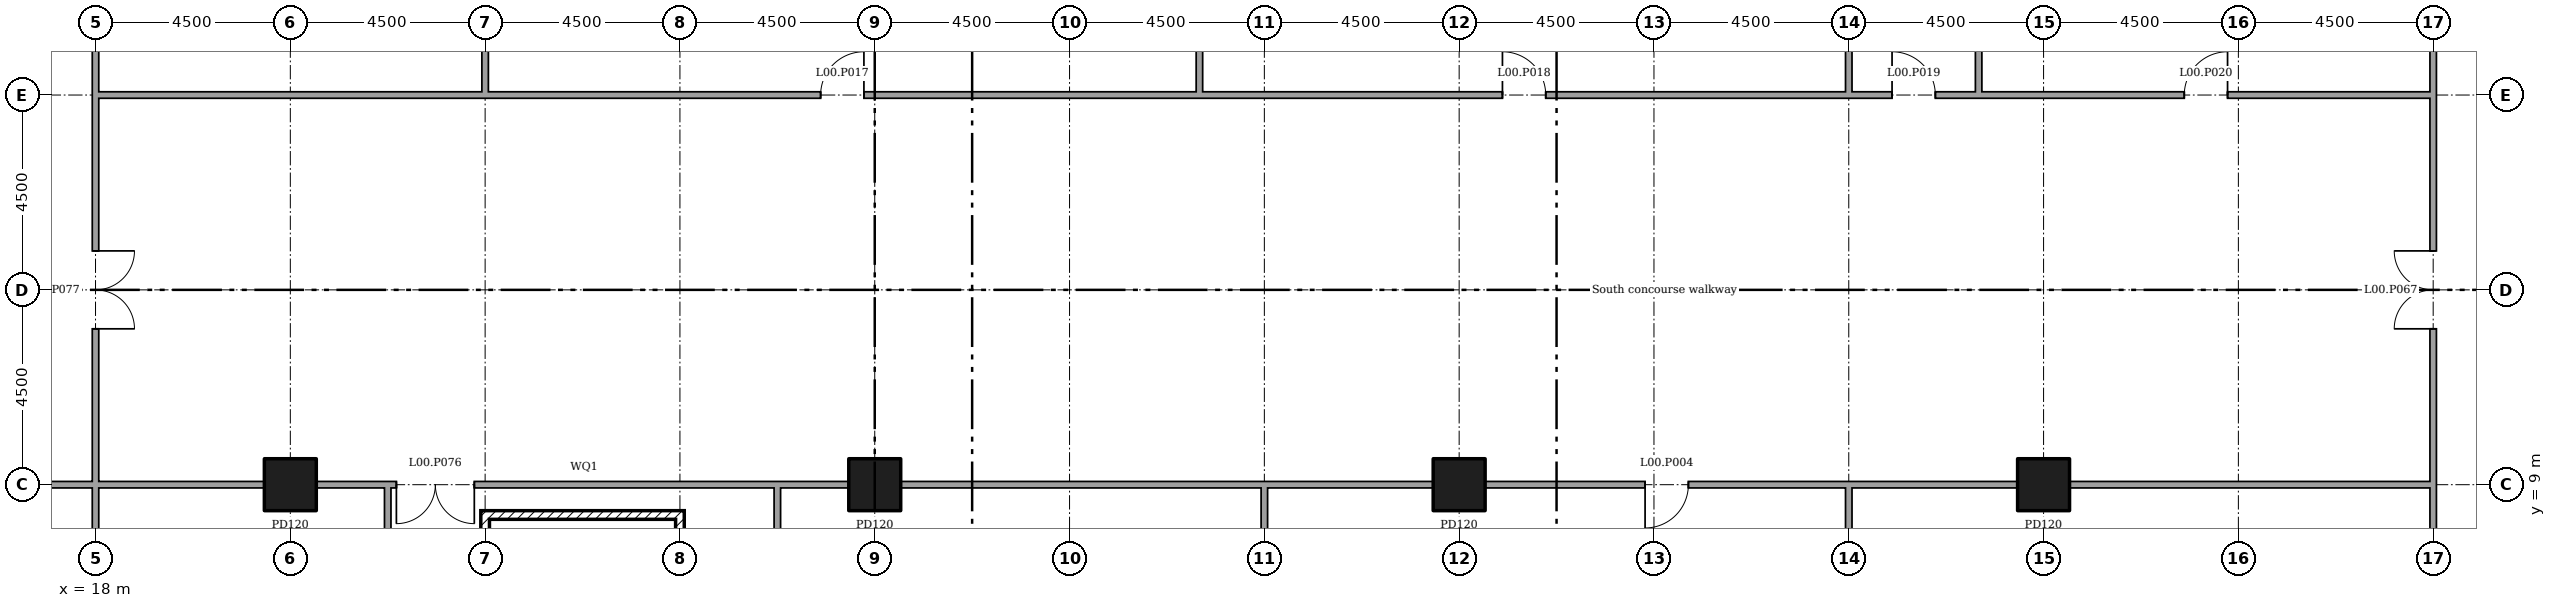
"""IFC4 building model, lengths in metres.
Left out: names, types, materials, properties, quantities, classifications, styles, units other than length and angle.
Written with IfcOpenShell. Run it as: python <this file> out.ifc"""

import sys

from ifc_helpers import new_model, si_unit, direction, frame, frame_2d, origin, origin_2d, place, context, subcontext, project, spatial, rectangle, extrude, element, fill, save


model = new_model("IFC4")
c1 = context("Model", 3, precision=1e-05, world=origin(), true_north=direction((0.0, 1.0)))
c2 = subcontext(c1, "Body", "Model", "MODEL_VIEW")
j1 = project(units=[si_unit("LENGTHUNIT", "METRE"), si_unit("PLANEANGLEUNIT", "RADIAN")], contexts=[c1])
p1 = place(None, origin())
s1 = spatial("IfcSite", under=j1, at=p1, CompositionType="ELEMENT")
p2 = place(p1, origin())
s2 = spatial("IfcBuilding", under=s1, at=p2, CompositionType="ELEMENT")
p3 = place(p2, origin())
s3 = spatial("IfcBuildingStorey", under=s2, at=p3, CompositionType="ELEMENT", Elevation=0.0)
for number, where in (
    (1, (22.5, 9.0, 0.0)),
    (2, (36.0, 9.0, 0.0)),
    (3, (49.5, 9.0, 0.0)),
    (4, (63.0, 9.0, 0.0)),
):
    element("IfcColumn", number, at=place(p3, frame(where)), inside=s3, PredefinedType="COLUMN", context=c2, shape_type="SweptSolid", body=[
        extrude(rectangle(XDim=1.2, YDim=1.2, at=origin_2d()), origin(), (0.0, 0.0, 1.0), 6.0),
    ])
p4 = place(p3, frame((72.0, 0.3, 0.0), z_axis=(0.0, 0.0, 1.0), x_axis=(0.0, 1.0, 0.0)))
e5 = element("IfcWall", 5, at=p4, inside=s3, PredefinedType="PARTITIONING", context=c2, shape_type="SweptSolid", body=[
    extrude(rectangle(XDim=8.775, YDim=0.15, at=frame_2d((4.387, 0.0))), origin(), (0.0, 0.0, 1.0), 5.55),
])
p5 = place(p4, frame((3.85, 0.0, 0.0)))
e6 = element("IfcOpeningElement", 6, at=p5, cuts=e5, PredefinedType="OPENING", context=c2, shape_type="SweptSolid", body=[
    extrude(rectangle(XDim=1.0, YDim=2.1, at=frame_2d((0.5, 1.05))), frame((0.0, 0.085, 0.0), z_axis=(0.0, -1.0, 0.0), x_axis=(1.0, 0.0, 0.0)), (0.0, 0.0, 1.0), 0.17),
])
p6 = place(p3, frame((72.0, 9.0, 0.0), z_axis=(0.0, 0.0, 1.0), x_axis=(0.0, 1.0, 0.0)))
e7 = element("IfcWall", 7, at=p6, inside=s3, PredefinedType="PARTITIONING", context=c2, shape_type="SweptSolid", body=[
    extrude(rectangle(XDim=9.075, YDim=0.15, at=frame_2d((4.538, 0.0))), origin(), (0.0, 0.0, 1.0), 5.55),
])
p7 = place(p6, frame((3.6, 0.0, 0.0)))
e8 = element("IfcOpeningElement", 8, at=p7, cuts=e7, PredefinedType="OPENING", context=c2, shape_type="SweptSolid", body=[
    extrude(rectangle(XDim=1.8, YDim=2.1, at=frame_2d((0.9, 1.05))), frame((0.0, 0.085, 0.0), z_axis=(0.0, -1.0, 0.0), x_axis=(1.0, 0.0, 0.0)), (0.0, 0.0, 1.0), 0.17),
])
p8 = place(p3, frame((72.0, 18.0, 0.0), z_axis=(0.0, 0.0, 1.0), x_axis=(0.0, 1.0, 0.0)))
e9 = element("IfcWall", 9, at=p8, inside=s3, PredefinedType="PARTITIONING", context=c2, shape_type="SweptSolid", body=[
    extrude(rectangle(XDim=4.425, YDim=0.15, at=frame_2d((2.212, 0.0))), origin(), (0.0, 0.0, 1.0), 5.55),
])
p9 = place(p3, frame((18.0, 0.3, 0.0), z_axis=(0.0, 0.0, 1.0), x_axis=(0.0, 1.0, 0.0)))
e10 = element("IfcWall", 10, at=p9, inside=s3, PredefinedType="PARTITIONING", context=c2, shape_type="SweptSolid", body=[
    extrude(rectangle(XDim=8.775, YDim=0.15, at=frame_2d((4.387, 0.0))), origin(), (0.0, 0.0, 1.0), 5.55),
])
p10 = place(p3, frame((9.595, 9.0, 0.0)))
e11 = element("IfcWall", 11, at=p10, inside=s3, PredefinedType="PARTITIONING", context=c2, shape_type="SweptSolid", body=[
    extrude(rectangle(XDim=8.48, YDim=0.15, at=frame_2d((4.24, 0.0))), origin(), (0.0, 0.0, 1.0), 5.55),
])
p11 = place(p10, frame((3.7, 0.0, 0.0)))
e12 = element("IfcOpeningElement", 12, at=p11, cuts=e11, PredefinedType="OPENING", context=c2, shape_type="SweptSolid", body=[
    extrude(rectangle(XDim=1.0, YDim=2.1, at=frame_2d((0.5, 1.05))), frame((0.0, 0.085, 0.0), z_axis=(0.0, -1.0, 0.0), x_axis=(1.0, 0.0, 0.0)), (0.0, 0.0, 1.0), 0.17),
])
p12 = place(p3, frame((24.75, 0.3, 0.0), z_axis=(0.0, 0.0, 1.0), x_axis=(0.0, 1.0, 0.0)))
e13 = element("IfcWall", 13, at=p12, inside=s3, PredefinedType="PARTITIONING", context=c2, shape_type="SweptSolid", body=[
    extrude(rectangle(XDim=8.775, YDim=0.15, at=frame_2d((4.387, 0.0))), origin(), (0.0, 0.0, 1.0), 5.55),
])
p13 = place(p12, frame((3.85, 0.0, 0.0)))
e14 = element("IfcOpeningElement", 14, at=p13, cuts=e13, PredefinedType="OPENING", context=c2, shape_type="SweptSolid", body=[
    extrude(rectangle(XDim=1.0, YDim=2.1, at=frame_2d((0.5, 1.05))), frame((0.0, 0.085, 0.0), z_axis=(0.0, -1.0, 0.0), x_axis=(1.0, 0.0, 0.0)), (0.0, 0.0, 1.0), 0.17),
])
p14 = place(p3, frame((18.075, 9.0, 0.0)))
e15 = element("IfcWall", 15, at=p14, inside=s3, PredefinedType="PARTITIONING", context=c2, shape_type="SweptSolid", body=[
    extrude(rectangle(XDim=3.83, YDim=0.15, at=frame_2d((1.915, 0.0))), origin(), (0.0, 0.0, 1.0), 5.55),
])
p15 = place(p3, frame((23.095, 9.0, 0.0)))
e16 = element("IfcWall", 16, at=p15, inside=s3, PredefinedType="PARTITIONING", context=c2, shape_type="SweptSolid", body=[
    extrude(rectangle(XDim=1.655, YDim=0.15, at=frame_2d((0.828, 0.0))), origin(), (0.0, 0.0, 1.0), 5.55),
])
p16 = place(p3, frame((33.75, 0.3, 0.0), z_axis=(0.0, 0.0, 1.0), x_axis=(0.0, 1.0, 0.0)))
e17 = element("IfcWall", 17, at=p16, inside=s3, PredefinedType="PARTITIONING", context=c2, shape_type="SweptSolid", body=[
    extrude(rectangle(XDim=8.775, YDim=0.15, at=frame_2d((4.387, 0.0))), origin(), (0.0, 0.0, 1.0), 5.55),
])
p17 = place(p16, frame((3.85, 0.0, 0.0)))
e18 = element("IfcOpeningElement", 18, at=p17, cuts=e17, PredefinedType="OPENING", context=c2, shape_type="SweptSolid", body=[
    extrude(rectangle(XDim=1.0, YDim=2.1, at=frame_2d((0.5, 1.05))), frame((0.0, 0.085, 0.0), z_axis=(0.0, -1.0, 0.0), x_axis=(1.0, 0.0, 0.0)), (0.0, 0.0, 1.0), 0.17),
])
p18 = place(p3, frame((24.825, 9.0, 0.0)))
e19 = element("IfcWall", 19, at=p18, inside=s3, PredefinedType="PARTITIONING", context=c2, shape_type="SweptSolid", body=[
    extrude(rectangle(XDim=8.925, YDim=0.15, at=frame_2d((4.462, 0.0))), origin(), (0.0, 0.0, 1.0), 5.55),
])
p19 = place(p18, frame((0.125, 0.0, 0.0)))
e20 = element("IfcOpeningElement", 20, at=p19, cuts=e19, PredefinedType="OPENING", context=c2, shape_type="SweptSolid", body=[
    extrude(rectangle(XDim=1.8, YDim=2.1, at=frame_2d((0.9, 1.05))), frame((0.0, 0.085, 0.0), z_axis=(0.0, -1.0, 0.0), x_axis=(1.0, 0.0, 0.0)), (0.0, 0.0, 1.0), 0.17),
])
p20 = place(p3, frame((27.0, 0.3, 0.0), z_axis=(0.0, 0.0, 1.0), x_axis=(0.0, 1.0, 0.0)))
e21 = element("IfcWall", 21, at=p20, inside=s3, PredefinedType="SOLIDWALL", context=c2, shape_type="SweptSolid", body=[
    extrude(rectangle(XDim=8.1, YDim=0.2, at=frame_2d((4.05, 0.0))), origin(), (0.0, 0.0, 1.0), 5.55),
])
p21 = place(p20, frame((0.6, 0.0, 0.0)))
e22 = element("IfcOpeningElement", 22, at=p21, cuts=e21, PredefinedType="OPENING", context=c2, shape_type="SweptSolid", body=[
    extrude(rectangle(XDim=1.1, YDim=2.1, at=frame_2d((0.55, 1.05))), frame((0.0, 0.11, 0.0), z_axis=(0.0, -1.0, 0.0), x_axis=(1.0, 0.0, 0.0)), (0.0, 0.0, 1.0), 0.22),
])
p22 = place(p3, frame((31.5, 0.3, 0.0), z_axis=(0.0, 0.0, 1.0), x_axis=(0.0, 1.0, 0.0)))
e23 = element("IfcWall", 23, at=p22, inside=s3, PredefinedType="SOLIDWALL", context=c2, shape_type="SweptSolid", body=[
    extrude(rectangle(XDim=8.1, YDim=0.2, at=frame_2d((4.05, 0.0))), origin(), (0.0, 0.0, 1.0), 5.55),
])
p23 = place(p3, frame((27.1, 8.3, 0.0)))
e24 = element("IfcWall", 24, at=p23, inside=s3, PredefinedType="SOLIDWALL", context=c2, shape_type="SweptSolid", body=[
    extrude(rectangle(XDim=4.3, YDim=0.2, at=frame_2d((2.15, 0.0))), origin(), (0.0, 0.0, 1.0), 5.55),
])
p24 = place(p3, frame((45.0, 0.3, 0.0), z_axis=(0.0, 0.0, 1.0), x_axis=(0.0, 1.0, 0.0)))
e25 = element("IfcWall", 25, at=p24, inside=s3, PredefinedType="PARTITIONING", context=c2, shape_type="SweptSolid", body=[
    extrude(rectangle(XDim=8.775, YDim=0.15, at=frame_2d((4.387, 0.0))), origin(), (0.0, 0.0, 1.0), 5.55),
])
p25 = place(p3, frame((33.825, 9.0, 0.0)))
e26 = element("IfcWall", 26, at=p25, inside=s3, PredefinedType="PARTITIONING", context=c2, shape_type="SweptSolid", body=[
    extrude(rectangle(XDim=1.58, YDim=0.15, at=frame_2d((0.79, 0.0))), origin(), (0.0, 0.0, 1.0), 5.55),
])
p26 = place(p3, frame((36.595, 9.0, 0.0)))
e27 = element("IfcWall", 27, at=p26, inside=s3, PredefinedType="PARTITIONING", context=c2, shape_type="SweptSolid", body=[
    extrude(rectangle(XDim=8.33, YDim=0.15, at=frame_2d((4.165, 0.0))), origin(), (0.0, 0.0, 1.0), 5.55),
])
p27 = place(p3, frame((58.5, 0.3, 0.0), z_axis=(0.0, 0.0, 1.0), x_axis=(0.0, 1.0, 0.0)))
e28 = element("IfcWall", 28, at=p27, inside=s3, PredefinedType="PARTITIONING", context=c2, shape_type="SweptSolid", body=[
    extrude(rectangle(XDim=8.775, YDim=0.15, at=frame_2d((4.387, 0.0))), origin(), (0.0, 0.0, 1.0), 5.55),
])
p28 = place(p3, frame((45.0, 9.0, 0.0)))
e29 = element("IfcWall", 29, at=p28, inside=s3, PredefinedType="PARTITIONING", context=c2, shape_type="SweptSolid", body=[
    extrude(rectangle(XDim=3.905, YDim=0.15, at=frame_2d((1.953, 0.0))), origin(), (0.0, 0.0, 1.0), 5.55),
])
p29 = place(p3, frame((50.095, 9.0, 0.0)))
e30 = element("IfcWall", 30, at=p29, inside=s3, PredefinedType="PARTITIONING", context=c2, shape_type="SweptSolid", body=[
    extrude(rectangle(XDim=8.405, YDim=0.15, at=frame_2d((4.203, 0.0))), origin(), (0.0, 0.0, 1.0), 5.55),
])
p30 = place(p29, frame((3.7, 0.0, 0.0)))
e31 = element("IfcOpeningElement", 31, at=p30, cuts=e30, PredefinedType="OPENING", context=c2, shape_type="SweptSolid", body=[
    extrude(rectangle(XDim=1.0, YDim=2.1, at=frame_2d((0.5, 1.05))), frame((0.0, 0.085, 0.0), z_axis=(0.0, -1.0, 0.0), x_axis=(1.0, 0.0, 0.0)), (0.0, 0.0, 1.0), 0.17),
])
p31 = place(p3, frame((58.575, 9.0, 0.0)))
e32 = element("IfcWall", 32, at=p31, inside=s3, PredefinedType="PARTITIONING", context=c2, shape_type="SweptSolid", body=[
    extrude(rectangle(XDim=3.83, YDim=0.15, at=frame_2d((1.915, 0.0))), origin(), (0.0, 0.0, 1.0), 5.55),
])
p32 = place(p3, frame((63.595, 9.0, 0.0)))
e33 = element("IfcWall", 33, at=p32, inside=s3, PredefinedType="PARTITIONING", context=c2, shape_type="SweptSolid", body=[
    extrude(rectangle(XDim=8.33, YDim=0.15, at=frame_2d((4.165, 0.0))), origin(), (0.0, 0.0, 1.0), 5.55),
])
p33 = place(p3, frame((18.0, 9.075, 0.0), z_axis=(0.0, 0.0, 1.0), x_axis=(0.0, 1.0, 0.0)))
e34 = element("IfcWall", 34, at=p33, inside=s3, PredefinedType="PARTITIONING", context=c2, shape_type="SweptSolid", body=[
    extrude(rectangle(XDim=9.0, YDim=0.15, at=frame_2d((4.5, 0.0))), origin(), (0.0, 0.0, 1.0), 5.55),
])
p34 = place(p33, frame((3.525, 0.0, 0.0)))
e35 = element("IfcOpeningElement", 35, at=p34, cuts=e34, PredefinedType="OPENING", context=c2, shape_type="SweptSolid", body=[
    extrude(rectangle(XDim=1.8, YDim=2.1, at=frame_2d((0.9, 1.05))), frame((0.0, 0.085, 0.0), z_axis=(0.0, -1.0, 0.0), x_axis=(1.0, 0.0, 0.0)), (0.0, 0.0, 1.0), 0.17),
])
p35 = place(p3, frame((18.075, 18.0, 0.0)))
e36 = element("IfcWall", 36, at=p35, inside=s3, PredefinedType="PARTITIONING", context=c2, shape_type="SweptSolid", body=[
    extrude(rectangle(XDim=9.0, YDim=0.15, at=frame_2d((4.5, 0.0))), origin(), (0.0, 0.0, 1.0), 5.55),
])
p36 = place(p3, frame((27.0, 18.0, 0.0)))
e37 = element("IfcWall", 37, at=p36, inside=s3, PredefinedType="PARTITIONING", context=c2, shape_type="SweptSolid", body=[
    extrude(rectangle(XDim=16.575, YDim=0.15, at=frame_2d((8.288, 0.0))), origin(), (0.0, 0.0, 1.0), 5.55),
])
p37 = place(p36, frame((7.75, 0.0, 0.0)))
e38 = element("IfcOpeningElement", 38, at=p37, cuts=e37, PredefinedType="OPENING", context=c2, shape_type="SweptSolid", body=[
    extrude(rectangle(XDim=1.0, YDim=2.1, at=frame_2d((0.5, 1.05))), frame((0.0, 0.085, 0.0), z_axis=(0.0, -1.0, 0.0), x_axis=(1.0, 0.0, 0.0)), (0.0, 0.0, 1.0), 0.17),
])
p38 = place(p3, frame((43.5, 18.0, 0.0)))
e39 = element("IfcWall", 39, at=p38, inside=s3, PredefinedType="PARTITIONING", context=c2, shape_type="SweptSolid", body=[
    extrude(rectangle(XDim=15.075, YDim=0.15, at=frame_2d((7.538, 0.0))), origin(), (0.0, 0.0, 1.0), 5.55),
])
p39 = place(p38, frame((7.0, 0.0, 0.0)))
e40 = element("IfcOpeningElement", 40, at=p39, cuts=e39, PredefinedType="OPENING", context=c2, shape_type="SweptSolid", body=[
    extrude(rectangle(XDim=1.0, YDim=2.1, at=frame_2d((0.5, 1.05))), frame((0.0, 0.085, 0.0), z_axis=(0.0, -1.0, 0.0), x_axis=(1.0, 0.0, 0.0)), (0.0, 0.0, 1.0), 0.17),
])
p40 = place(p3, frame((58.5, 18.0, 0.0)))
e41 = element("IfcWall", 41, at=p40, inside=s3, PredefinedType="PARTITIONING", context=c2, shape_type="SweptSolid", body=[
    extrude(rectangle(XDim=3.075, YDim=0.15, at=frame_2d((1.538, 0.0))), origin(), (0.0, 0.0, 1.0), 5.55),
])
p41 = place(p40, frame((1.0, 0.0, 0.0)))
e42 = element("IfcOpeningElement", 42, at=p41, cuts=e41, PredefinedType="OPENING", context=c2, shape_type="SweptSolid", body=[
    extrude(rectangle(XDim=1.0, YDim=2.1, at=frame_2d((0.5, 1.05))), frame((0.0, 0.085, 0.0), z_axis=(0.0, -1.0, 0.0), x_axis=(1.0, 0.0, 0.0)), (0.0, 0.0, 1.0), 0.17),
])
p42 = place(p3, frame((61.5, 18.0, 0.0)))
e43 = element("IfcWall", 43, at=p42, inside=s3, PredefinedType="PARTITIONING", context=c2, shape_type="SweptSolid", body=[
    extrude(rectangle(XDim=10.425, YDim=0.15, at=frame_2d((5.212, 0.0))), origin(), (0.0, 0.0, 1.0), 5.55),
])
p43 = place(p42, frame((4.75, 0.0, 0.0)))
e44 = element("IfcOpeningElement", 44, at=p43, cuts=e43, PredefinedType="OPENING", context=c2, shape_type="SweptSolid", body=[
    extrude(rectangle(XDim=1.0, YDim=2.1, at=frame_2d((0.5, 1.05))), frame((0.0, 0.085, 0.0), z_axis=(0.0, -1.0, 0.0), x_axis=(1.0, 0.0, 0.0)), (0.0, 0.0, 1.0), 0.17),
])
p44 = place(p3, frame((18.0, 18.0, 0.0), z_axis=(0.0, 0.0, 1.0), x_axis=(0.0, 1.0, 0.0)))
e45 = element("IfcWall", 45, at=p44, inside=s3, PredefinedType="PARTITIONING", context=c2, shape_type="SweptSolid", body=[
    extrude(rectangle(XDim=22.575, YDim=0.15, at=frame_2d((11.288, 0.0))), origin(), (0.0, 0.0, 1.0), 5.55),
])
p45 = place(p44, frame((10.75, 0.0, 0.0)))
e46 = element("IfcOpeningElement", 46, at=p45, cuts=e45, PredefinedType="OPENING", context=c2, shape_type="SweptSolid", body=[
    extrude(rectangle(XDim=1.0, YDim=2.1, at=frame_2d((0.5, 1.05))), frame((0.0, 0.085, 0.0), z_axis=(0.0, -1.0, 0.0), x_axis=(1.0, 0.0, 0.0)), (0.0, 0.0, 1.0), 0.17),
])
p46 = place(p3, frame((27.0, 18.075, 0.0), z_axis=(0.0, 0.0, 1.0), x_axis=(0.0, 1.0, 0.0)))
e47 = element("IfcWall", 47, at=p46, inside=s3, PredefinedType="PARTITIONING", context=c2, shape_type="SweptSolid", body=[
    extrude(rectangle(XDim=9.0, YDim=0.15, at=frame_2d((4.5, 0.0))), origin(), (0.0, 0.0, 1.0), 5.55),
])
p47 = place(p3, frame((43.5, 18.075, 0.0), z_axis=(0.0, 0.0, 1.0), x_axis=(0.0, 1.0, 0.0)))
e48 = element("IfcWall", 48, at=p47, inside=s3, PredefinedType="PARTITIONING", context=c2, shape_type="SweptSolid", body=[
    extrude(rectangle(XDim=7.7, YDim=0.15, at=frame_2d((3.85, 0.0))), origin(), (0.0, 0.0, 1.0), 5.55),
])
p48 = place(p3, frame((58.5, 18.075, 0.0), z_axis=(0.0, 0.0, 1.0), x_axis=(0.0, 1.0, 0.0)))
e49 = element("IfcWall", 49, at=p48, inside=s3, PredefinedType="PARTITIONING", context=c2, shape_type="SweptSolid", body=[
    extrude(rectangle(XDim=7.625, YDim=0.15, at=frame_2d((3.812, 0.0))), origin(), (0.0, 0.0, 1.0), 5.55),
])
p49 = place(p3, frame((61.5, 18.075, 0.0), z_axis=(0.0, 0.0, 1.0), x_axis=(0.0, 1.0, 0.0)))
e50 = element("IfcWall", 50, at=p49, inside=s3, PredefinedType="PARTITIONING", context=c2, shape_type="SweptSolid", body=[
    extrude(rectangle(XDim=9.0, YDim=0.15, at=frame_2d((4.5, 0.0))), origin(), (0.0, 0.0, 1.0), 5.55),
])
p50 = place(p30, frame((1.0, 0.0, 0.0), x_axis=(-1.0, 0.0, 0.0)))
e51 = element("IfcDoor", 51, at=p50, inside=s3, OperationType="SINGLE_SWING_LEFT", PredefinedType="DOOR", context=c2, shape_type="SweptSolid", body=[
    extrude(rectangle(XDim=1.0, YDim=2.1, at=frame_2d((0.5, 1.05))), frame((0.0, 0.025, 0.0), z_axis=(0.0, -1.0, 0.0), x_axis=(1.0, 0.0, 0.0)), (0.0, 0.0, 1.0), 0.05),
])
fill(e31, e51)
p51 = place(p37, origin())
e52 = element("IfcDoor", 52, at=p51, inside=s3, OperationType="SINGLE_SWING_LEFT", PredefinedType="DOOR", context=c2, shape_type="SweptSolid", body=[
    extrude(rectangle(XDim=1.0, YDim=2.1, at=frame_2d((0.5, 1.05))), frame((0.0, 0.025, 0.0), z_axis=(0.0, -1.0, 0.0), x_axis=(1.0, 0.0, 0.0)), (0.0, 0.0, 1.0), 0.05),
])
fill(e38, e52)
p52 = place(p39, origin())
e53 = element("IfcDoor", 53, at=p52, inside=s3, OperationType="SINGLE_SWING_RIGHT", PredefinedType="DOOR", context=c2, shape_type="SweptSolid", body=[
    extrude(rectangle(XDim=1.0, YDim=2.1, at=frame_2d((0.5, 1.05))), frame((0.0, 0.025, 0.0), z_axis=(0.0, -1.0, 0.0), x_axis=(1.0, 0.0, 0.0)), (0.0, 0.0, 1.0), 0.05),
])
fill(e40, e53)
p53 = place(p41, origin())
e54 = element("IfcDoor", 54, at=p53, inside=s3, OperationType="SINGLE_SWING_RIGHT", PredefinedType="DOOR", context=c2, shape_type="SweptSolid", body=[
    extrude(rectangle(XDim=1.0, YDim=2.1, at=frame_2d((0.5, 1.05))), frame((0.0, 0.025, 0.0), z_axis=(0.0, -1.0, 0.0), x_axis=(1.0, 0.0, 0.0)), (0.0, 0.0, 1.0), 0.05),
])
fill(e42, e54)
p54 = place(p43, origin())
e55 = element("IfcDoor", 55, at=p54, inside=s3, OperationType="SINGLE_SWING_LEFT", PredefinedType="DOOR", context=c2, shape_type="SweptSolid", body=[
    extrude(rectangle(XDim=1.0, YDim=2.1, at=frame_2d((0.5, 1.05))), frame((0.0, 0.025, 0.0), z_axis=(0.0, -1.0, 0.0), x_axis=(1.0, 0.0, 0.0)), (0.0, 0.0, 1.0), 0.05),
])
fill(e44, e55)
p55 = place(p7, origin())
e56 = element("IfcDoor", 56, at=p55, inside=s3, OperationType="DOUBLE_DOOR_SINGLE_SWING", PredefinedType="DOOR", context=c2, shape_type="SweptSolid", body=[
    extrude(rectangle(XDim=1.8, YDim=2.1, at=frame_2d((0.9, 1.05))), frame((0.0, 0.025, 0.0), z_axis=(0.0, -1.0, 0.0), x_axis=(1.0, 0.0, 0.0)), (0.0, 0.0, 1.0), 0.05),
])
fill(e8, e56)
p56 = place(p19, frame((1.8, 0.0, 0.0), x_axis=(-1.0, 0.0, 0.0)))
e57 = element("IfcDoor", 57, at=p56, inside=s3, OperationType="DOUBLE_DOOR_SINGLE_SWING", PredefinedType="DOOR", context=c2, shape_type="SweptSolid", body=[
    extrude(rectangle(XDim=1.8, YDim=2.1, at=frame_2d((0.9, 1.05))), frame((0.0, 0.025, 0.0), z_axis=(0.0, -1.0, 0.0), x_axis=(1.0, 0.0, 0.0)), (0.0, 0.0, 1.0), 0.05),
])
fill(e20, e57)
p57 = place(p34, frame((1.8, 0.0, 0.0), x_axis=(-1.0, 0.0, 0.0)))
e58 = element("IfcDoor", 58, at=p57, inside=s3, OperationType="DOUBLE_DOOR_SINGLE_SWING", PredefinedType="DOOR", context=c2, shape_type="SweptSolid", body=[
    extrude(rectangle(XDim=1.8, YDim=2.1, at=frame_2d((0.9, 1.05))), frame((0.0, 0.025, 0.0), z_axis=(0.0, -1.0, 0.0), x_axis=(1.0, 0.0, 0.0)), (0.0, 0.0, 1.0), 0.05),
])
fill(e35, e58)
save(model, sys.argv[1])
